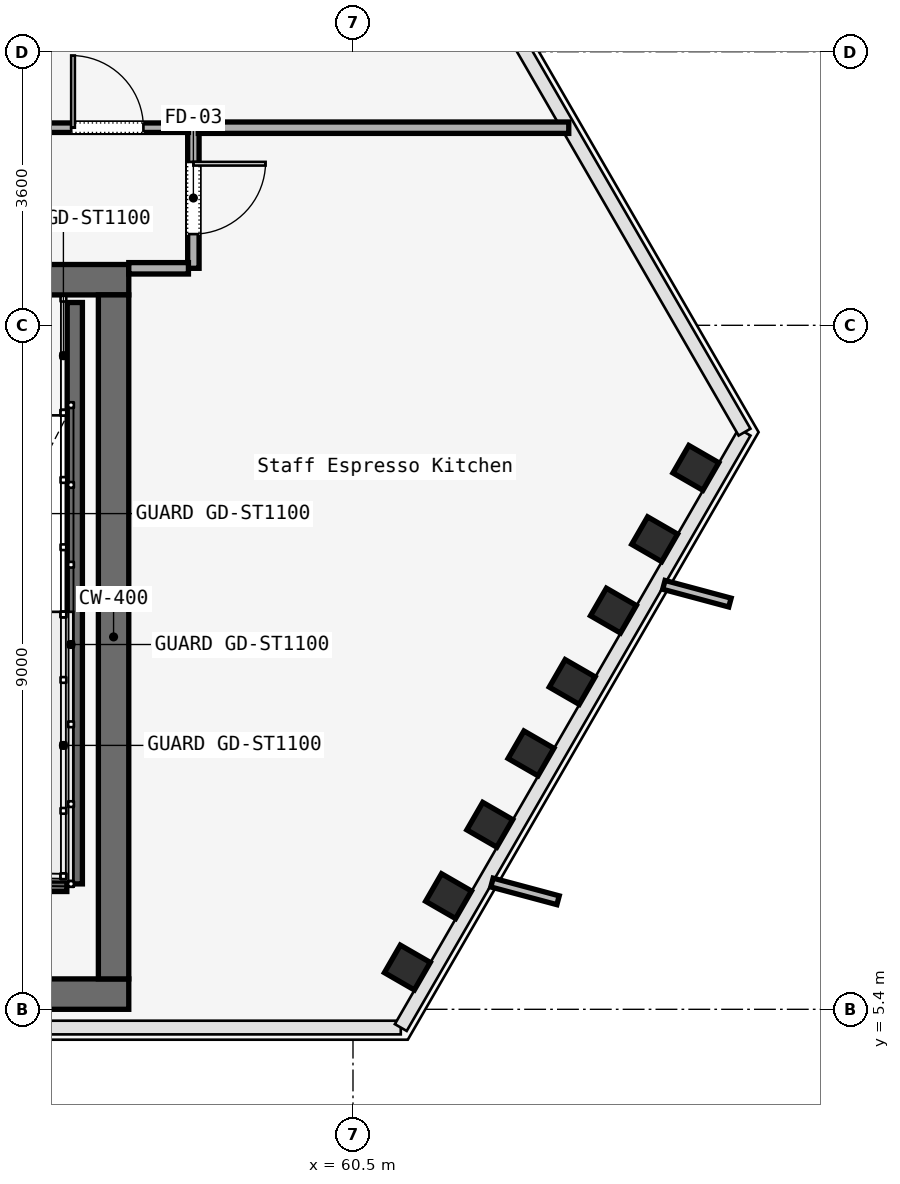
"""IFC4 building model, lengths in metres.
Left out: names, types, materials, properties, quantities, classifications, styles, units other than length and angle.
Written with IfcOpenShell. Run it as: python <this file> out.ifc"""

import sys

from ifc_helpers import new_model, si_unit, direction, frame, frame_2d, origin, origin_2d, place, context, subcontext, project, spatial, rectangle, i_section, extrude, element, fill, save


model = new_model("IFC4")
c1 = context("Model", 3, precision=1e-05, world=origin(), true_north=direction((0.0, 1.0)))
c2 = subcontext(c1, "Body", "Model", "MODEL_VIEW")
j1 = project(units=[si_unit("LENGTHUNIT", "METRE"), si_unit("PLANEANGLEUNIT", "RADIAN")], contexts=[c1])
p1 = place(None, origin())
s1 = spatial("IfcSite", under=j1, at=p1, CompositionType="ELEMENT")
p2 = place(p1, origin())
s2 = spatial("IfcBuilding", under=s1, at=p2, CompositionType="ELEMENT")
p3 = place(p2, frame((0.0, 0.0, 195.4)))
s3 = spatial("IfcBuildingStorey", under=s2, at=p3, CompositionType="ELEMENT", Elevation=195.4)
p4 = place(p3, frame((26.45, 15.0, 0.0), z_axis=(0.0, 0.0, 1.0), x_axis=(1.0, 0.0, 0.0)))
e1 = element("IfcWall", 1, at=p4, inside=s3, PredefinedType="SOLIDWALL", context=c2, shape_type="SweptSolid", body=[
    extrude(rectangle(XDim=31.1, YDim=0.4, at=frame_2d((15.55, 0.0))), origin(), (0.0, 0.0, 1.0), 3.58),
])
p5 = place(p4, frame((1.65, 0.0, 0.0)))
e2 = element("IfcOpeningElement", 2, at=p5, cuts=e1, PredefinedType="OPENING", context=c2, shape_type="SweptSolid", body=[
    extrude(rectangle(XDim=1.1, YDim=2.2, at=frame_2d((0.55, 1.1))), frame((0.0, 0.2, 0.0), z_axis=(0.0, -1.0, 0.0), x_axis=(1.0, 0.0, 0.0)), (0.0, 0.0, 1.0), 0.4),
])
p6 = place(p4, frame((13.65, 0.0, 0.0)))
e3 = element("IfcOpeningElement", 3, at=p6, cuts=e1, PredefinedType="OPENING", context=c2, shape_type="SweptSolid", body=[
    extrude(rectangle(XDim=1.1, YDim=2.2, at=frame_2d((0.55, 1.1))), frame((0.0, 0.2, 0.0), z_axis=(0.0, -1.0, 0.0), x_axis=(1.0, 0.0, 0.0)), (0.0, 0.0, 1.0), 0.4),
])
p7 = place(p4, frame((25.55, 0.0, 0.0)))
e4 = element("IfcOpeningElement", 4, at=p7, cuts=e1, PredefinedType="OPENING", context=c2, shape_type="SweptSolid", body=[
    extrude(rectangle(XDim=1.1, YDim=2.2, at=frame_2d((0.55, 1.1))), frame((0.0, 0.2, 0.0), z_axis=(0.0, -1.0, 0.0), x_axis=(1.0, 0.0, 0.0)), (0.0, 0.0, 1.0), 0.4),
])
p8 = place(p4, frame((10.7, 0.0, 0.0)))
e5 = element("IfcOpeningElement", 5, at=p8, cuts=e1, PredefinedType="OPENING", context=c2, shape_type="SweptSolid", body=[
    extrude(rectangle(XDim=1.4, YDim=2.2, at=frame_2d((0.7, 1.1))), frame((0.0, 0.2, 0.0), z_axis=(0.0, -1.0, 0.0), x_axis=(1.0, 0.0, 0.0)), (0.0, 0.0, 1.0), 0.4),
])
p9 = place(p4, frame((19.35, 0.0, 0.0)))
e6 = element("IfcOpeningElement", 6, at=p9, cuts=e1, PredefinedType="OPENING", context=c2, shape_type="SweptSolid", body=[
    extrude(rectangle(XDim=1.1, YDim=2.2, at=frame_2d((0.55, 1.1))), frame((0.0, 0.2, 0.0), z_axis=(0.0, -1.0, 0.0), x_axis=(1.0, 0.0, 0.0)), (0.0, 0.0, 1.0), 0.4),
])
p10 = place(p4, frame((21.4, 0.0, 0.0)))
e7 = element("IfcOpeningElement", 7, at=p10, cuts=e1, PredefinedType="OPENING", context=c2, shape_type="SweptSolid", body=[
    extrude(rectangle(XDim=0.9, YDim=2.1, at=frame_2d((0.45, 1.05))), frame((0.0, 0.2, 0.0), z_axis=(0.0, -1.0, 0.0), x_axis=(1.0, 0.0, 0.0)), (0.0, 0.0, 1.0), 0.4),
])
p11 = place(p4, frame((23.35, 0.0, 0.0)))
e8 = element("IfcOpeningElement", 8, at=p11, cuts=e1, PredefinedType="OPENING", context=c2, shape_type="SweptSolid", body=[
    extrude(rectangle(XDim=1.3, YDim=2.3, at=frame_2d((0.65, 1.15))), frame((0.0, 0.2, 0.0), z_axis=(0.0, -1.0, 0.0), x_axis=(1.0, 0.0, 0.0)), (0.0, 0.0, 1.0), 0.4),
])
p12 = place(p3, frame((26.45, 5.6, 0.0), z_axis=(0.0, 0.0, 1.0), x_axis=(1.0, 0.0, 0.0)))
e9 = element("IfcWall", 9, at=p12, inside=s3, PredefinedType="SOLIDWALL", context=c2, shape_type="SweptSolid", body=[
    extrude(rectangle(XDim=31.1, YDim=0.4, at=frame_2d((15.55, 0.0))), origin(), (0.0, 0.0, 1.0), 3.58),
])
p13 = place(p3, frame((57.35, 5.8, 0.0), z_axis=(0.0, 0.0, 1.0), x_axis=(0.0, 1.0, 0.0)))
e10 = element("IfcWall", 10, at=p13, inside=s3, PredefinedType="SOLIDWALL", context=c2, shape_type="SweptSolid", body=[
    extrude(rectangle(XDim=9.0, YDim=0.4, at=frame_2d((4.5, 0.0))), origin(), (0.0, 0.0, 1.0), 3.58),
])
for number, where, z_axis, x_axis in (
    (11, (61.215, 5.95, 0.0), (0.0, 0.0, 1.0), (0.5, 0.866, 0.0)),
    (12, (61.757, 6.889, 0.0), (0.0, 0.0, 1.0), (0.5, 0.866, 0.0)),
    (13, (62.3, 7.828, 0.0), (0.0, 0.0, 1.0), (0.5, 0.866, 0.0)),
    (14, (62.842, 8.767, 0.0), (0.0, 0.0, 1.0), (0.5, 0.866, 0.0)),
    (15, (63.384, 9.707, 0.0), (0.0, 0.0, 1.0), (0.5, 0.866, 0.0)),
    (16, (63.927, 10.646, 0.0), (0.0, 0.0, 1.0), (0.5, 0.866, 0.0)),
    (17, (64.469, 11.585, 0.0), (0.0, 0.0, 1.0), (0.5, 0.866, 0.0)),
    (18, (65.011, 12.524, 0.0), (0.0, 0.0, 1.0), (0.5, 0.866, 0.0)),
):
    element("IfcColumn", number, at=place(p3, frame(where, z_axis=z_axis, x_axis=x_axis)), inside=s3, PredefinedType="COLUMN", context=c2, shape_type="SweptSolid", body=[
        extrude(i_section(OverallWidth=0.418, OverallDepth=0.455, WebThickness=0.042, FlangeThickness=0.052, FilletRadius=0.015, at=origin_2d()), origin(), (0.0, 0.0, 1.0), 3.58),
    ])
p14 = place(p3, frame((56.84, 14.7, 0.0), z_axis=(0.0, 0.0, 1.0), x_axis=(0.0, -1.0, 0.0)))
e19 = element("IfcWall", 19, at=p14, inside=s3, PredefinedType="SOLIDWALL", context=c2, shape_type="SweptSolid", body=[
    extrude(rectangle(XDim=7.65, YDim=0.2, at=frame_2d((3.825, 0.0))), origin(), (0.0, 0.0, 1.0), 3.8),
])
p15 = place(p3, frame((53.62, 7.05, 0.0), z_axis=(0.0, 0.0, 1.0), x_axis=(1.0, 0.0, 0.0)))
e20 = element("IfcWall", 20, at=p15, inside=s3, PredefinedType="SOLIDWALL", context=c2, shape_type="SweptSolid", body=[
    extrude(rectangle(XDim=3.115, YDim=0.2, at=frame_2d((1.558, 0.0))), origin(), (0.0, 0.0, 1.0), 3.8),
])
p16 = place(p3, frame((58.4, 17.0, 0.0), z_axis=(0.0, 0.0, 1.0), x_axis=(0.0, -1.0, 0.0)))
e21 = element("IfcWall", 21, at=p16, inside=s3, PredefinedType="PARTITIONING", context=c2, shape_type="SweptSolid", body=[
    extrude(rectangle(XDim=1.85, YDim=0.15, at=frame_2d((0.925, 0.0))), origin(), (0.0, 0.0, 1.0), 3.01),
])
p17 = place(p16, frame((0.45, 0.0, 0.0)))
e22 = element("IfcOpeningElement", 22, at=p17, cuts=e21, PredefinedType="OPENING", context=c2, shape_type="SweptSolid", body=[
    extrude(rectangle(XDim=0.95, YDim=2.2, at=frame_2d((0.475, 1.1))), frame((0.0, 0.075, 0.0), z_axis=(0.0, -1.0, 0.0), x_axis=(1.0, 0.0, 0.0)), (0.0, 0.0, 1.0), 0.15),
])
p18 = place(p3, frame((58.335, 15.15, 0.0), z_axis=(0.0, 0.0, 1.0), x_axis=(-1.0, 0.0, 0.0)))
e23 = element("IfcWall", 23, at=p18, inside=s3, PredefinedType="PARTITIONING", context=c2, shape_type="SweptSolid", body=[
    extrude(rectangle(XDim=0.785, YDim=0.15, at=frame_2d((0.393, 0.0))), origin(), (0.0, 0.0, 1.0), 3.01),
])
p19 = place(p3, frame((56.2, 17.0, 0.0), z_axis=(0.0, 0.0, 1.0), x_axis=(1.0, 0.0, 0.0)))
e24 = element("IfcWall", 24, at=p19, inside=s3, PredefinedType="PARTITIONING", context=c2, shape_type="SweptSolid", body=[
    extrude(rectangle(XDim=2.135, YDim=0.125, at=frame_2d((1.067, 0.0))), origin(), (0.0, 0.0, 1.0), 3.01),
])
p20 = place(p19, frame((0.593, 0.0, 0.0)))
e25 = element("IfcOpeningElement", 25, at=p20, cuts=e24, PredefinedType="OPENING", context=c2, shape_type="SweptSolid", body=[
    extrude(rectangle(XDim=0.95, YDim=2.2, at=frame_2d((0.475, 1.1))), frame((0.0, 0.062, 0.0), z_axis=(0.0, -1.0, 0.0), x_axis=(1.0, 0.0, 0.0)), (0.0, 0.0, 1.0), 0.125),
])
p21 = place(p3, frame((58.465, 17.0, 0.0), z_axis=(0.0, 0.0, 1.0), x_axis=(1.0, 0.0, 0.0)))
e26 = element("IfcWall", 26, at=p21, inside=s3, PredefinedType="PARTITIONING", context=c2, shape_type="SweptSolid", body=[
    extrude(rectangle(XDim=4.874, YDim=0.15, at=frame_2d((2.437, 0.0))), origin(), (0.0, 0.0, 1.0), 3.01),
])
p22 = place(p17, origin())
e27 = element("IfcDoor", 27, at=p22, inside=s3, OperationType="SINGLE_SWING_LEFT", PredefinedType="DOOR", context=c2, shape_type="SweptSolid", body=[
    extrude(rectangle(XDim=0.95, YDim=2.2, at=frame_2d((0.475, 1.1))), frame((0.0, 0.025, 0.0), z_axis=(0.0, -1.0, 0.0), x_axis=(1.0, 0.0, 0.0)), (0.0, 0.0, 1.0), 0.05),
])
fill(e22, e27)
p23 = place(p20, origin())
e28 = element("IfcDoor", 28, at=p23, inside=s3, OperationType="SINGLE_SWING_LEFT", PredefinedType="DOOR", context=c2, shape_type="SweptSolid", body=[
    extrude(rectangle(XDim=0.95, YDim=2.2, at=frame_2d((0.475, 1.1))), frame((0.0, 0.025, 0.0), z_axis=(0.0, -1.0, 0.0), x_axis=(1.0, 0.0, 0.0)), (0.0, 0.0, 1.0), 0.05),
])
fill(e25, e28)
save(model, sys.argv[1])
